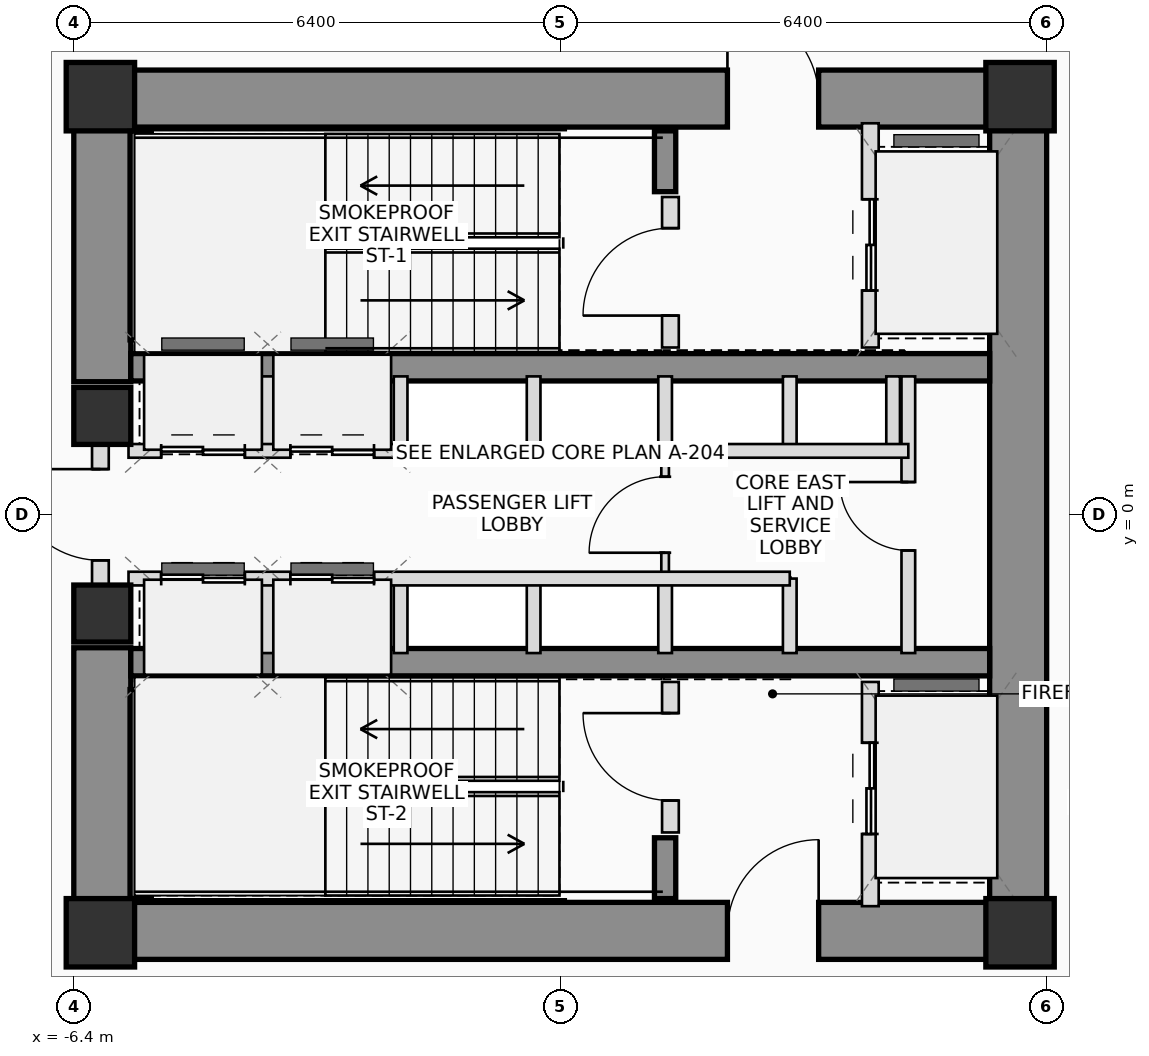
"""IFC4 building model, lengths in metres.
Left out: names, types, materials, properties, quantities, classifications, styles, units other than length and angle.
Written with IfcOpenShell. Run it as: python <this file> out.ifc"""

import sys

from ifc_helpers import new_model, si_unit, direction, frame, frame_2d, origin, origin_2d, place, context, subcontext, project, spatial, rectangle, extrude, source, transform, mapped, element, fill, save


model = new_model("IFC4")
c1 = context("Model", 3, precision=1e-05, world=origin(), true_north=direction((0.0, 1.0)))
c2 = subcontext(c1, "Body", "Model", "MODEL_VIEW")
j1 = project(units=[si_unit("LENGTHUNIT", "METRE"), si_unit("PLANEANGLEUNIT", "RADIAN")], contexts=[c1])
p1 = place(None, origin())
s1 = spatial("IfcSite", under=j1, at=p1, CompositionType="ELEMENT")
p2 = place(p1, origin())
s2 = spatial("IfcBuilding", under=s1, at=p2, CompositionType="ELEMENT")
p3 = place(p2, frame((0.0, 0.0, 34.9)))
s3 = spatial("IfcBuildingStorey", under=s2, at=p3, CompositionType="ELEMENT", Elevation=34.9)
m1 = source(origin(), c2, "Body", "SweptSolid", [
    extrude(rectangle(XDim=0.9, YDim=0.9, at=origin_2d()), origin(), (0.0, 0.0, 1.0), 3.7),
])
for number, where, z_axis, x_axis in (
    (1, (-6.05, -5.5, 0.0), (0.0, 0.0, 1.0), (1.0, 0.0, 0.0)),
    (2, (6.05, -5.5, 0.0), (0.0, 0.0, 1.0), (1.0, 0.0, 0.0)),
    (3, (6.05, 5.5, 0.0), (0.0, 0.0, 1.0), (1.0, 0.0, 0.0)),
    (4, (-6.05, 5.5, 0.0), (0.0, 0.0, 1.0), (1.0, 0.0, 0.0)),
):
    element("IfcColumn", number, at=place(p3, frame(where, z_axis=z_axis, x_axis=x_axis)), inside=s3, PredefinedType="COLUMN", context=c2, shape_type="MappedRepresentation", body=[
        mapped(m1, transform((0.0, 0.0, 0.0), scale=1.0)),
    ])
p4 = place(p3, frame((-6.4, 5.475, 0.0), z_axis=(0.0, 0.0, 1.0), x_axis=(1.0, 0.0, 0.0)))
e5 = element("IfcWall", 5, at=p4, inside=s3, PredefinedType="SHEAR", context=c2, shape_type="SweptSolid", body=[
    extrude(rectangle(XDim=12.8, YDim=0.75, at=frame_2d((6.4, 0.0))), origin(), (0.0, 0.0, 1.0), 3.7),
])
p5 = place(p4, frame((8.6, 0.0, 0.0)))
e6 = element("IfcOpeningElement", 6, at=p5, cuts=e5, PredefinedType="OPENING", context=c2, shape_type="SweptSolid", body=[
    extrude(rectangle(XDim=1.2, YDim=2.2, at=frame_2d((0.6, 1.1))), frame((0.0, 0.385, 0.0), z_axis=(0.0, -1.0, 0.0), x_axis=(1.0, 0.0, 0.0)), (0.0, 0.0, 1.0), 0.77),
])
p6 = place(p3, frame((-6.4, -5.475, 0.0), z_axis=(0.0, 0.0, 1.0), x_axis=(1.0, 0.0, 0.0)))
e7 = element("IfcWall", 7, at=p6, inside=s3, PredefinedType="SHEAR", context=c2, shape_type="SweptSolid", body=[
    extrude(rectangle(XDim=12.8, YDim=0.75, at=frame_2d((6.4, 0.0))), origin(), (0.0, 0.0, 1.0), 3.7),
])
p7 = place(p6, frame((8.6, 0.0, 0.0)))
e8 = element("IfcOpeningElement", 8, at=p7, cuts=e7, PredefinedType="OPENING", context=c2, shape_type="SweptSolid", body=[
    extrude(rectangle(XDim=1.2, YDim=2.2, at=frame_2d((0.6, 1.1))), frame((0.0, 0.385, 0.0), z_axis=(0.0, -1.0, 0.0), x_axis=(1.0, 0.0, 0.0)), (0.0, 0.0, 1.0), 0.77),
])
p8 = place(p3, frame((6.025, -5.1, 0.0), z_axis=(0.0, 0.0, 1.0), x_axis=(0.0, 1.0, 0.0)))
e9 = element("IfcWall", 9, at=p8, inside=s3, PredefinedType="SHEAR", context=c2, shape_type="SweptSolid", body=[
    extrude(rectangle(XDim=10.2, YDim=0.75, at=frame_2d((5.1, 0.0))), origin(), (0.0, 0.0, 1.0), 3.7),
])
for number, where, z_axis, x_axis in (
    (10, (-6.025, -5.1, 0.0), (0.0, 0.0, 1.0), (0.0, 1.0, 0.0)),
    (11, (-6.025, 1.75, 0.0), (0.0, 0.0, 1.0), (0.0, 1.0, 0.0)),
):
    element("IfcWall", number, at=place(p3, frame(where, z_axis=z_axis, x_axis=x_axis)), inside=s3, PredefinedType="SHEAR", context=c2, shape_type="SweptSolid", body=[
        extrude(rectangle(XDim=3.35, YDim=0.75, at=frame_2d((1.675, 0.0))), origin(), (0.0, 0.0, 1.0), 3.7),
    ])
for number, where, z_axis, x_axis in (
    (12, (-5.65, 1.94, 0.0), (0.0, 0.0, 1.0), (1.0, 0.0, 0.0)),
    (13, (-5.65, -1.94, 0.0), (0.0, 0.0, 1.0), (1.0, 0.0, 0.0)),
):
    element("IfcWall", number, at=place(p3, frame(where, z_axis=z_axis, x_axis=x_axis)), inside=s3, PredefinedType="SHEAR", context=c2, shape_type="SweptSolid", body=[
        extrude(rectangle(XDim=11.3, YDim=0.36, at=frame_2d((5.65, 0.0))), origin(), (0.0, 0.0, 1.0), 3.7),
    ])
p9 = place(p3, frame((-5.52, 2.3, 0.0), z_axis=(0.0, 0.0, 1.0), x_axis=(0.0, 1.0, 0.0)))
e14 = element("IfcWall", 14, at=p9, inside=s3, PredefinedType="SHEAR", context=c2, shape_type="SweptSolid", body=[
    extrude(rectangle(XDim=2.75, YDim=0.28, at=frame_2d((1.375, 0.0))), origin(), (0.0, 0.0, 1.0), 3.7),
])
p10 = place(p3, frame((1.38, 4.25, 0.0), z_axis=(0.0, 0.0, 1.0), x_axis=(0.0, 1.0, 0.0)))
e15 = element("IfcWall", 15, at=p10, inside=s3, PredefinedType="SHEAR", context=c2, shape_type="SweptSolid", body=[
    extrude(rectangle(XDim=0.8, YDim=0.28, at=frame_2d((0.4, 0.0))), origin(), (0.0, 0.0, 1.0), 3.7),
])
p11 = place(p3, frame((-5.52, -5.05, 0.0), z_axis=(0.0, 0.0, 1.0), x_axis=(0.0, 1.0, 0.0)))
e16 = element("IfcWall", 16, at=p11, inside=s3, PredefinedType="SHEAR", context=c2, shape_type="SweptSolid", body=[
    extrude(rectangle(XDim=2.75, YDim=0.28, at=frame_2d((1.375, 0.0))), origin(), (0.0, 0.0, 1.0), 3.7),
])
p12 = place(p3, frame((1.38, -5.05, 0.0), z_axis=(0.0, 0.0, 1.0), x_axis=(0.0, 1.0, 0.0)))
e17 = element("IfcWall", 17, at=p12, inside=s3, PredefinedType="SHEAR", context=c2, shape_type="SweptSolid", body=[
    extrude(rectangle(XDim=0.8, YDim=0.28, at=frame_2d((0.4, 0.0))), origin(), (0.0, 0.0, 1.0), 3.7),
])
m2 = source(origin(), c2, "Body", "SweptSolid", [
    extrude(rectangle(XDim=0.75, YDim=0.75, at=origin_2d()), origin(), (0.0, 0.0, 1.0), 3.7),
])
for number, where, z_axis, x_axis in (
    (18, (-6.025, -1.3, 0.0), (0.0, 0.0, 1.0), (1.0, 0.0, 0.0)),
    (19, (-6.025, 1.3, 0.0), (0.0, 0.0, 1.0), (1.0, 0.0, 0.0)),
):
    element("IfcColumn", number, at=place(p3, frame(where, z_axis=z_axis, x_axis=x_axis)), inside=s3, PredefinedType="COLUMN", context=c2, shape_type="MappedRepresentation", body=[
        mapped(m2, transform((0.0, 0.0, 0.0), scale=1.0)),
    ])
p13 = place(p3, frame((-6.05, -0.95, 0.0), z_axis=(0.0, 0.0, 1.0), x_axis=(0.0, 1.0, 0.0)))
e20 = element("IfcWall", 20, at=p13, inside=s3, PredefinedType="PLUMBINGWALL", context=c2, shape_type="SweptSolid", body=[
    extrude(rectangle(XDim=1.9, YDim=0.22, at=frame_2d((0.95, 0.0))), origin(), (0.0, 0.0, 1.0), 2.475),
])
p14 = place(p13, frame((0.35, 0.0, 0.0)))
e21 = element("IfcOpeningElement", 21, at=p14, cuts=e20, PredefinedType="OPENING", context=c2, shape_type="SweptSolid", body=[
    extrude(rectangle(XDim=1.2, YDim=2.2, at=frame_2d((0.6, 1.1))), frame((0.0, 0.12, 0.0), z_axis=(0.0, -1.0, 0.0), x_axis=(1.0, 0.0, 0.0)), (0.0, 0.0, 1.0), 0.24),
])
p15 = place(p3, frame((1.45, 2.2, 0.0), z_axis=(0.0, 0.0, 1.0), x_axis=(0.0, 1.0, 0.0)))
e22 = element("IfcWall", 22, at=p15, inside=s3, PredefinedType="PLUMBINGWALL", context=c2, shape_type="SweptSolid", body=[
    extrude(rectangle(XDim=1.98, YDim=0.22, at=frame_2d((0.99, 0.0))), origin(), (0.0, 0.0, 1.0), 3.495),
])
p16 = place(p15, frame((0.42, 0.0, 0.0)))
e23 = element("IfcOpeningElement", 23, at=p16, cuts=e22, PredefinedType="OPENING", context=c2, shape_type="SweptSolid", body=[
    extrude(rectangle(XDim=1.15, YDim=2.15, at=frame_2d((0.575, 1.075))), frame((0.0, 0.12, 0.0), z_axis=(0.0, -1.0, 0.0), x_axis=(1.0, 0.0, 0.0)), (0.0, 0.0, 1.0), 0.24),
])
p17 = place(p3, frame((4.08, 2.2, 0.0), z_axis=(0.0, 0.0, 1.0), x_axis=(0.0, 1.0, 0.0)))
e24 = element("IfcWall", 24, at=p17, inside=s3, PredefinedType="PLUMBINGWALL", context=c2, shape_type="SweptSolid", body=[
    extrude(rectangle(XDim=2.95, YDim=0.22, at=frame_2d((1.475, 0.0))), origin(), (0.0, 0.0, 1.0), 3.495),
])
p18 = place(p17, frame((0.75, 0.0, 0.0)))
e25 = element("IfcOpeningElement", 25, at=p18, cuts=e24, PredefinedType="OPENING", context=c2, shape_type="SweptSolid", body=[
    extrude(rectangle(XDim=1.2, YDim=2.25, at=frame_2d((0.6, 1.125))), frame((0.0, 0.12, 0.0), z_axis=(0.0, -1.0, 0.0), x_axis=(1.0, 0.0, 0.0)), (0.0, 0.0, 1.0), 0.24),
])
p19 = place(p3, frame((1.45, -4.18, 0.0), z_axis=(0.0, 0.0, 1.0), x_axis=(0.0, 1.0, 0.0)))
e26 = element("IfcWall", 26, at=p19, inside=s3, PredefinedType="PLUMBINGWALL", context=c2, shape_type="SweptSolid", body=[
    extrude(rectangle(XDim=1.98, YDim=0.22, at=frame_2d((0.99, 0.0))), origin(), (0.0, 0.0, 1.0), 3.495),
])
p20 = place(p19, frame((0.42, 0.0, 0.0)))
e27 = element("IfcOpeningElement", 27, at=p20, cuts=e26, PredefinedType="OPENING", context=c2, shape_type="SweptSolid", body=[
    extrude(rectangle(XDim=1.15, YDim=2.15, at=frame_2d((0.575, 1.075))), frame((0.0, 0.12, 0.0), z_axis=(0.0, -1.0, 0.0), x_axis=(1.0, 0.0, 0.0)), (0.0, 0.0, 1.0), 0.24),
])
p21 = place(p3, frame((4.08, -5.15, 0.0), z_axis=(0.0, 0.0, 1.0), x_axis=(0.0, 1.0, 0.0)))
e28 = element("IfcWall", 28, at=p21, inside=s3, PredefinedType="PLUMBINGWALL", context=c2, shape_type="SweptSolid", body=[
    extrude(rectangle(XDim=2.95, YDim=0.22, at=frame_2d((1.475, 0.0))), origin(), (0.0, 0.0, 1.0), 3.495),
])
p22 = place(p21, frame((0.95, 0.0, 0.0)))
e29 = element("IfcOpeningElement", 29, at=p22, cuts=e28, PredefinedType="OPENING", context=c2, shape_type="SweptSolid", body=[
    extrude(rectangle(XDim=1.2, YDim=2.25, at=frame_2d((0.6, 1.125))), frame((0.0, 0.12, 0.0), z_axis=(0.0, -1.0, 0.0), x_axis=(1.0, 0.0, 0.0)), (0.0, 0.0, 1.0), 0.24),
])
p23 = place(p3, frame((1.38, -0.84, 0.0), z_axis=(0.0, 0.0, 1.0), x_axis=(0.0, 1.0, 0.0)))
e30 = element("IfcWall", 30, at=p23, inside=s3, PredefinedType="PARTITIONING", context=c2, shape_type="SweptSolid", body=[
    extrude(rectangle(XDim=1.68, YDim=0.1, at=frame_2d((0.84, 0.0))), origin(), (0.0, 0.0, 1.0), 3.495),
])
p24 = place(p23, frame((0.34, 0.0, 0.0)))
e31 = element("IfcOpeningElement", 31, at=p24, cuts=e30, PredefinedType="OPENING", context=c2, shape_type="SweptSolid", body=[
    extrude(rectangle(XDim=1.0, YDim=2.25, at=frame_2d((0.5, 1.125))), frame((0.0, 0.06, 0.0), z_axis=(0.0, -1.0, 0.0), x_axis=(1.0, 0.0, 0.0)), (0.0, 0.0, 1.0), 0.12),
])
for number, where, z_axis, x_axis in (
    (32, (-3.85, 0.84, 0.0), (0.0, 0.0, 1.0), (0.0, 1.0, 0.0)),
    (33, (-3.85, -1.82, 0.0), (0.0, 0.0, 1.0), (0.0, 1.0, 0.0)),
    (34, (-2.1, 0.84, 0.0), (0.0, 0.0, 1.0), (0.0, 1.0, 0.0)),
    (35, (-2.1, -1.82, 0.0), (0.0, 0.0, 1.0), (0.0, 1.0, 0.0)),
    (36, (-0.35, 0.84, 0.0), (0.0, 0.0, 1.0), (0.0, 1.0, 0.0)),
    (37, (-0.35, -1.82, 0.0), (0.0, 0.0, 1.0), (0.0, 1.0, 0.0)),
    (38, (1.38, 0.84, 0.0), (0.0, 0.0, 1.0), (0.0, 1.0, 0.0)),
    (39, (1.38, -1.82, 0.0), (0.0, 0.0, 1.0), (0.0, 1.0, 0.0)),
    (40, (3.02, 0.84, 0.0), (0.0, 0.0, 1.0), (0.0, 1.0, 0.0)),
    (41, (4.38, 0.84, 0.0), (0.0, 0.0, 1.0), (0.0, 1.0, 0.0)),
    (42, (3.02, -1.82, 0.0), (0.0, 0.0, 1.0), (0.0, 1.0, 0.0)),
):
    element("IfcWall", number, at=place(p3, frame(where, z_axis=z_axis, x_axis=x_axis)), inside=s3, PredefinedType="PLUMBINGWALL", context=c2, shape_type="SweptSolid", body=[
        extrude(rectangle(XDim=0.98, YDim=0.18, at=frame_2d((0.49, 0.0))), origin(), (0.0, 0.0, 1.0), 3.495),
    ])
p25 = place(p3, frame((4.58, -1.82, 0.0), z_axis=(0.0, 0.0, 1.0), x_axis=(0.0, 1.0, 0.0)))
e43 = element("IfcWall", 43, at=p25, inside=s3, PredefinedType="PLUMBINGWALL", context=c2, shape_type="SweptSolid", body=[
    extrude(rectangle(XDim=3.64, YDim=0.18, at=frame_2d((1.82, 0.0))), origin(), (0.0, 0.0, 1.0), 3.495),
])
p26 = place(p25, frame((1.35, 0.0, 0.0)))
e44 = element("IfcOpeningElement", 44, at=p26, cuts=e43, PredefinedType="OPENING", context=c2, shape_type="SweptSolid", body=[
    extrude(rectangle(XDim=0.9, YDim=2.05, at=frame_2d((0.45, 1.025))), frame((0.0, 0.1, 0.0), z_axis=(0.0, -1.0, 0.0), x_axis=(1.0, 0.0, 0.0)), (0.0, 0.0, 1.0), 0.2),
])
p27 = place(p3, frame((-5.68, 0.84, 0.0), z_axis=(0.0, 0.0, 1.0), x_axis=(1.0, 0.0, 0.0)))
e45 = element("IfcWall", 45, at=p27, inside=s3, PredefinedType="PLUMBINGWALL", context=c2, shape_type="SweptSolid", body=[
    extrude(rectangle(XDim=10.26, YDim=0.18, at=frame_2d((5.13, 0.0))), origin(), (0.0, 0.0, 1.0), 3.495),
])
p28 = place(p27, frame((0.43, 0.0, 0.0)))
e46 = element("IfcOpeningElement", 46, at=p28, cuts=e45, PredefinedType="OPENING", context=c2, shape_type="SweptSolid", body=[
    extrude(rectangle(XDim=1.1, YDim=2.2, at=frame_2d((0.55, 1.1))), frame((0.0, 0.1, 0.0), z_axis=(0.0, -1.0, 0.0), x_axis=(1.0, 0.0, 0.0)), (0.0, 0.0, 1.0), 0.2),
])
p29 = place(p27, frame((2.13, 0.0, 0.0)))
e47 = element("IfcOpeningElement", 47, at=p29, cuts=e45, PredefinedType="OPENING", context=c2, shape_type="SweptSolid", body=[
    extrude(rectangle(XDim=1.1, YDim=2.2, at=frame_2d((0.55, 1.1))), frame((0.0, 0.1, 0.0), z_axis=(0.0, -1.0, 0.0), x_axis=(1.0, 0.0, 0.0)), (0.0, 0.0, 1.0), 0.2),
])
p30 = place(p3, frame((-5.68, -0.84, 0.0), z_axis=(0.0, 0.0, 1.0), x_axis=(1.0, 0.0, 0.0)))
e48 = element("IfcWall", 48, at=p30, inside=s3, PredefinedType="PLUMBINGWALL", context=c2, shape_type="SweptSolid", body=[
    extrude(rectangle(XDim=8.7, YDim=0.18, at=frame_2d((4.35, 0.0))), origin(), (0.0, 0.0, 1.0), 3.495),
])
p31 = place(p30, frame((0.43, 0.0, 0.0)))
e49 = element("IfcOpeningElement", 49, at=p31, cuts=e48, PredefinedType="OPENING", context=c2, shape_type="SweptSolid", body=[
    extrude(rectangle(XDim=1.1, YDim=2.2, at=frame_2d((0.55, 1.1))), frame((0.0, 0.1, 0.0), z_axis=(0.0, -1.0, 0.0), x_axis=(1.0, 0.0, 0.0)), (0.0, 0.0, 1.0), 0.2),
])
p32 = place(p30, frame((2.13, 0.0, 0.0)))
e50 = element("IfcOpeningElement", 50, at=p32, cuts=e48, PredefinedType="OPENING", context=c2, shape_type="SweptSolid", body=[
    extrude(rectangle(XDim=1.1, YDim=2.2, at=frame_2d((0.55, 1.1))), frame((0.0, 0.1, 0.0), z_axis=(0.0, -1.0, 0.0), x_axis=(1.0, 0.0, 0.0)), (0.0, 0.0, 1.0), 0.2),
])
p33 = place(p5, origin())
e51 = element("IfcDoor", 51, at=p33, inside=s3, OperationType="SINGLE_SWING_LEFT", PredefinedType="DOOR", context=c2, shape_type="SweptSolid", body=[
    extrude(rectangle(XDim=1.2, YDim=2.2, at=frame_2d((0.6, 1.1))), frame((0.0, 0.025, 0.0), z_axis=(0.0, -1.0, 0.0), x_axis=(1.0, 0.0, 0.0)), (0.0, 0.0, 1.0), 0.05),
])
fill(e6, e51)
p34 = place(p7, origin())
e52 = element("IfcDoor", 52, at=p34, inside=s3, OperationType="SINGLE_SWING_RIGHT", PredefinedType="DOOR", context=c2, shape_type="SweptSolid", body=[
    extrude(rectangle(XDim=1.2, YDim=2.2, at=frame_2d((0.6, 1.1))), frame((0.0, 0.025, 0.0), z_axis=(0.0, -1.0, 0.0), x_axis=(1.0, 0.0, 0.0)), (0.0, 0.0, 1.0), 0.05),
])
fill(e8, e52)
p35 = place(p14, origin())
e53 = element("IfcDoor", 53, at=p35, inside=s3, OperationType="SINGLE_SWING_RIGHT", PredefinedType="DOOR", context=c2, shape_type="SweptSolid", body=[
    extrude(rectangle(XDim=1.2, YDim=2.2, at=frame_2d((0.6, 1.1))), frame((0.0, 0.025, 0.0), z_axis=(0.0, -1.0, 0.0), x_axis=(1.0, 0.0, 0.0)), (0.0, 0.0, 1.0), 0.05),
])
fill(e21, e53)
p36 = place(p16, origin())
e54 = element("IfcDoor", 54, at=p36, inside=s3, OperationType="SINGLE_SWING_LEFT", PredefinedType="DOOR", context=c2, shape_type="SweptSolid", body=[
    extrude(rectangle(XDim=1.15, YDim=2.15, at=frame_2d((0.575, 1.075))), frame((0.0, 0.025, 0.0), z_axis=(0.0, -1.0, 0.0), x_axis=(1.0, 0.0, 0.0)), (0.0, 0.0, 1.0), 0.05),
])
fill(e23, e54)
p37 = place(p18, origin())
e55 = element("IfcDoor", 55, at=p37, inside=s3, OperationType="DOUBLE_DOOR_SLIDING", PredefinedType="DOOR", context=c2, shape_type="SweptSolid", body=[
    extrude(rectangle(XDim=1.2, YDim=2.25, at=frame_2d((0.6, 1.125))), frame((0.0, 0.025, 0.0), z_axis=(0.0, -1.0, 0.0), x_axis=(1.0, 0.0, 0.0)), (0.0, 0.0, 1.0), 0.05),
])
fill(e25, e55)
p38 = place(p20, origin())
e56 = element("IfcDoor", 56, at=p38, inside=s3, OperationType="SINGLE_SWING_RIGHT", PredefinedType="DOOR", context=c2, shape_type="SweptSolid", body=[
    extrude(rectangle(XDim=1.15, YDim=2.15, at=frame_2d((0.575, 1.075))), frame((0.0, 0.025, 0.0), z_axis=(0.0, -1.0, 0.0), x_axis=(1.0, 0.0, 0.0)), (0.0, 0.0, 1.0), 0.05),
])
fill(e27, e56)
p39 = place(p22, origin())
e57 = element("IfcDoor", 57, at=p39, inside=s3, OperationType="DOUBLE_DOOR_SLIDING", PredefinedType="DOOR", context=c2, shape_type="SweptSolid", body=[
    extrude(rectangle(XDim=1.2, YDim=2.25, at=frame_2d((0.6, 1.125))), frame((0.0, 0.025, 0.0), z_axis=(0.0, -1.0, 0.0), x_axis=(1.0, 0.0, 0.0)), (0.0, 0.0, 1.0), 0.05),
])
fill(e29, e57)
p40 = place(p24, origin())
e58 = element("IfcDoor", 58, at=p40, inside=s3, OperationType="SINGLE_SWING_LEFT", PredefinedType="DOOR", context=c2, shape_type="SweptSolid", body=[
    extrude(rectangle(XDim=1.0, YDim=2.25, at=frame_2d((0.5, 1.125))), frame((0.0, 0.025, 0.0), z_axis=(0.0, -1.0, 0.0), x_axis=(1.0, 0.0, 0.0)), (0.0, 0.0, 1.0), 0.05),
])
fill(e31, e58)
p41 = place(p26, origin())
e59 = element("IfcDoor", 59, at=p41, inside=s3, OperationType="SINGLE_SWING_RIGHT", PredefinedType="DOOR", context=c2, shape_type="SweptSolid", body=[
    extrude(rectangle(XDim=0.9, YDim=2.05, at=frame_2d((0.45, 1.025))), frame((0.0, 0.025, 0.0), z_axis=(0.0, -1.0, 0.0), x_axis=(1.0, 0.0, 0.0)), (0.0, 0.0, 1.0), 0.05),
])
fill(e44, e59)
p42 = place(p28, origin())
e60 = element("IfcDoor", 60, at=p42, inside=s3, OperationType="DOUBLE_DOOR_SLIDING", PredefinedType="DOOR", context=c2, shape_type="SweptSolid", body=[
    extrude(rectangle(XDim=1.1, YDim=2.2, at=frame_2d((0.55, 1.1))), frame((0.0, 0.025, 0.0), z_axis=(0.0, -1.0, 0.0), x_axis=(1.0, 0.0, 0.0)), (0.0, 0.0, 1.0), 0.05),
])
fill(e46, e60)
p43 = place(p29, origin())
e61 = element("IfcDoor", 61, at=p43, inside=s3, OperationType="DOUBLE_DOOR_SLIDING", PredefinedType="DOOR", context=c2, shape_type="SweptSolid", body=[
    extrude(rectangle(XDim=1.1, YDim=2.2, at=frame_2d((0.55, 1.1))), frame((0.0, 0.025, 0.0), z_axis=(0.0, -1.0, 0.0), x_axis=(1.0, 0.0, 0.0)), (0.0, 0.0, 1.0), 0.05),
])
fill(e47, e61)
p44 = place(p31, origin())
e62 = element("IfcDoor", 62, at=p44, inside=s3, OperationType="DOUBLE_DOOR_SLIDING", PredefinedType="DOOR", context=c2, shape_type="SweptSolid", body=[
    extrude(rectangle(XDim=1.1, YDim=2.2, at=frame_2d((0.55, 1.1))), frame((0.0, 0.025, 0.0), z_axis=(0.0, -1.0, 0.0), x_axis=(1.0, 0.0, 0.0)), (0.0, 0.0, 1.0), 0.05),
])
fill(e49, e62)
p45 = place(p32, origin())
e63 = element("IfcDoor", 63, at=p45, inside=s3, OperationType="DOUBLE_DOOR_SLIDING", PredefinedType="DOOR", context=c2, shape_type="SweptSolid", body=[
    extrude(rectangle(XDim=1.1, YDim=2.2, at=frame_2d((0.55, 1.1))), frame((0.0, 0.025, 0.0), z_axis=(0.0, -1.0, 0.0), x_axis=(1.0, 0.0, 0.0)), (0.0, 0.0, 1.0), 0.05),
])
fill(e50, e63)
save(model, sys.argv[1])
